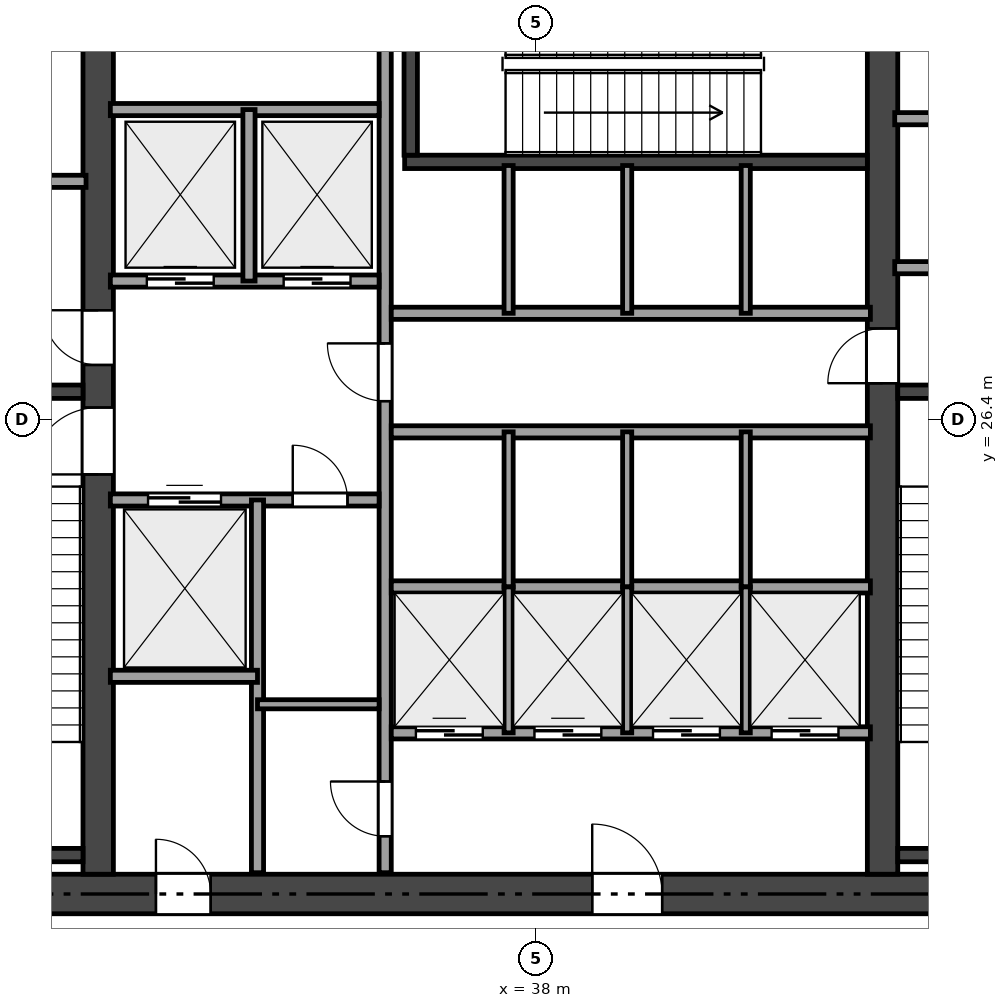
"""IFC4 building model, lengths in metres.
Left out: names, types, materials, properties, quantities, classifications, styles, units other than length and angle.
Written with IfcOpenShell. Run it as: python <this file> out.ifc"""

import sys

from ifc_helpers import new_model, si_unit, direction, frame, frame_2d, origin, place, context, subcontext, project, spatial, rectangle, extrude, element, fill, save


model = new_model("IFC4")
c1 = context("Model", 3, precision=1e-05, world=origin(), true_north=direction((0.0, 1.0)))
c2 = subcontext(c1, "Body", "Model", "MODEL_VIEW")
j1 = project(units=[si_unit("LENGTHUNIT", "METRE"), si_unit("PLANEANGLEUNIT", "RADIAN")], contexts=[c1])
p1 = place(None, origin())
s1 = spatial("IfcSite", under=j1, at=p1, CompositionType="ELEMENT")
p2 = place(p1, origin())
s2 = spatial("IfcBuilding", under=s1, at=p2, CompositionType="ELEMENT")
p3 = place(p2, frame((0.0, 0.0, -5.4)))
s3 = spatial("IfcBuildingStorey", under=s2, at=p3, CompositionType="ELEMENT", Elevation=-5.4)
p4 = place(p3, frame((26.475, 18.6, 0.0), z_axis=(0.0, 0.0, 1.0), x_axis=(1.0, 0.0, 0.0)))
e1 = element("IfcWall", 1, at=p4, inside=s3, PredefinedType="SHEAR", context=c2, shape_type="SweptSolid", body=[
    extrude(rectangle(XDim=21.45, YDim=0.65, at=frame_2d((10.725, 0.0))), origin(), (0.0, 0.0, 1.0), 5.05),
])
p5 = place(p4, frame((12.45, 0.0, 0.0)))
e2 = element("IfcOpeningElement", 2, at=p5, cuts=e1, PredefinedType="OPENING", context=c2, shape_type="SweptSolid", body=[
    extrude(rectangle(XDim=1.15, YDim=2.15, at=frame_2d((0.575, 1.075))), frame((0.0, 0.335, 0.0), z_axis=(0.0, -1.0, 0.0), x_axis=(1.0, 0.0, 0.0)), (0.0, 0.0, 1.0), 0.67),
])
p6 = place(p4, frame((5.275, 0.0, 0.0)))
e3 = element("IfcOpeningElement", 3, at=p6, cuts=e1, PredefinedType="OPENING", context=c2, shape_type="SweptSolid", body=[
    extrude(rectangle(XDim=0.9, YDim=2.1, at=frame_2d((0.45, 1.05))), frame((0.0, 0.335, 0.0), z_axis=(0.0, -1.0, 0.0), x_axis=(1.0, 0.0, 0.0)), (0.0, 0.0, 1.0), 0.67),
])
p7 = place(p3, frame((30.8, 18.925, 0.0), z_axis=(0.0, 0.0, 1.0), x_axis=(0.0, 1.0, 0.0)))
e4 = element("IfcWall", 4, at=p7, inside=s3, PredefinedType="SHEAR", context=c2, shape_type="SweptSolid", body=[
    extrude(rectangle(XDim=14.95, YDim=0.5, at=frame_2d((7.475, 0.0))), origin(), (0.0, 0.0, 1.0), 5.05),
])
p8 = place(p7, frame((6.575, 0.0, 0.0)))
e5 = element("IfcOpeningElement", 5, at=p8, cuts=e4, PredefinedType="OPENING", context=c2, shape_type="SweptSolid", body=[
    extrude(rectangle(XDim=1.1, YDim=2.15, at=frame_2d((0.55, 1.075))), frame((0.0, 0.26, 0.0), z_axis=(0.0, -1.0, 0.0), x_axis=(1.0, 0.0, 0.0)), (0.0, 0.0, 1.0), 0.52),
])
p9 = place(p7, frame((8.375, 0.0, 0.0)))
e6 = element("IfcOpeningElement", 6, at=p9, cuts=e4, PredefinedType="OPENING", context=c2, shape_type="SweptSolid", body=[
    extrude(rectangle(XDim=0.9, YDim=2.1, at=frame_2d((0.45, 1.05))), frame((0.0, 0.26, 0.0), z_axis=(0.0, -1.0, 0.0), x_axis=(1.0, 0.0, 0.0)), (0.0, 0.0, 1.0), 0.52),
])
p10 = place(p3, frame((43.7, 18.925, 0.0), z_axis=(0.0, 0.0, 1.0), x_axis=(0.0, 1.0, 0.0)))
e7 = element("IfcWall", 7, at=p10, inside=s3, PredefinedType="SHEAR", context=c2, shape_type="SweptSolid", body=[
    extrude(rectangle(XDim=14.95, YDim=0.5, at=frame_2d((7.475, 0.0))), origin(), (0.0, 0.0, 1.0), 5.05),
])
p11 = place(p10, frame((8.075, 0.0, 0.0)))
e8 = element("IfcOpeningElement", 8, at=p11, cuts=e7, PredefinedType="OPENING", context=c2, shape_type="SweptSolid", body=[
    extrude(rectangle(XDim=0.9, YDim=2.1, at=frame_2d((0.45, 1.05))), frame((0.0, 0.26, 0.0), z_axis=(0.0, -1.0, 0.0), x_axis=(1.0, 0.0, 0.0)), (0.0, 0.0, 1.0), 0.52),
])
for number, where, z_axis, x_axis in (
    (9, (27.125, 26.86, 0.0), (0.0, 0.0, 1.0), (1.0, 0.0, 0.0)),
    (10, (27.125, 19.24, 0.0), (0.0, 0.0, 1.0), (1.0, 0.0, 0.0)),
):
    element("IfcWall", number, at=place(p3, frame(where, z_axis=z_axis, x_axis=x_axis)), inside=s3, PredefinedType="SHEAR", context=c2, shape_type="SweptSolid", body=[
        extrude(rectangle(XDim=3.425, YDim=0.22, at=frame_2d((1.712, 0.0))), origin(), (0.0, 0.0, 1.0), 5.05),
    ])
for number, where, z_axis, x_axis in (
    (11, (43.95, 26.86, 0.0), (0.0, 0.0, 1.0), (1.0, 0.0, 0.0)),
    (12, (43.95, 19.24, 0.0), (0.0, 0.0, 1.0), (1.0, 0.0, 0.0)),
):
    element("IfcWall", number, at=place(p3, frame(where, z_axis=z_axis, x_axis=x_axis)), inside=s3, PredefinedType="SHEAR", context=c2, shape_type="SweptSolid", body=[
        extrude(rectangle(XDim=3.325, YDim=0.22, at=frame_2d((1.663, 0.0))), origin(), (0.0, 0.0, 1.0), 5.05),
    ])
p12 = place(p3, frame((35.84, 30.64, 0.0), z_axis=(0.0, 0.0, 1.0), x_axis=(1.0, 0.0, 0.0)))
e13 = element("IfcWall", 13, at=p12, inside=s3, PredefinedType="SHEAR", context=c2, shape_type="SweptSolid", body=[
    extrude(rectangle(XDim=7.61, YDim=0.22, at=frame_2d((3.805, 0.0))), origin(), (0.0, 0.0, 1.0), 5.05),
])
p13 = place(p3, frame((35.94, 30.75, 0.0), z_axis=(0.0, 0.0, 1.0), x_axis=(0.0, 1.0, 0.0)))
e14 = element("IfcWall", 14, at=p13, inside=s3, PredefinedType="SHEAR", context=c2, shape_type="SweptSolid", body=[
    extrude(rectangle(XDim=3.125, YDim=0.22, at=frame_2d((1.562, 0.0))), origin(), (0.0, 0.0, 1.0), 5.05),
])
p14 = place(p3, frame((27.15, 30.32, 0.0), z_axis=(0.0, 0.0, 1.0), x_axis=(1.0, 0.0, 0.0)))
e15 = element("IfcWall", 15, at=p14, inside=s3, PredefinedType="SOLIDWALL", context=c2, shape_type="SweptSolid", body=[
    extrude(rectangle(XDim=3.45, YDim=0.2, at=frame_2d((1.725, 0.0))), origin(), (0.0, 0.0, 1.0), 5.05),
])
p15 = place(p3, frame((43.9, 28.9, 0.0), z_axis=(0.0, 0.0, 1.0), x_axis=(1.0, 0.0, 0.0)))
e16 = element("IfcWall", 16, at=p15, inside=s3, PredefinedType="SOLIDWALL", context=c2, shape_type="SweptSolid", body=[
    extrude(rectangle(XDim=3.35, YDim=0.2, at=frame_2d((1.675, 0.0))), origin(), (0.0, 0.0, 1.0), 5.05),
])
p16 = place(p15, frame((1.15, 0.0, 0.0)))
e17 = element("IfcOpeningElement", 17, at=p16, cuts=e16, PredefinedType="OPENING", context=c2, shape_type="SweptSolid", body=[
    extrude(rectangle(XDim=0.9, YDim=2.1, at=frame_2d((0.45, 1.05))), frame((0.0, 0.11, 0.0), z_axis=(0.0, -1.0, 0.0), x_axis=(1.0, 0.0, 0.0)), (0.0, 0.0, 1.0), 0.22),
])
p17 = place(p3, frame((43.9, 31.35, 0.0), z_axis=(0.0, 0.0, 1.0), x_axis=(1.0, 0.0, 0.0)))
e18 = element("IfcWall", 18, at=p17, inside=s3, PredefinedType="SOLIDWALL", context=c2, shape_type="SweptSolid", body=[
    extrude(rectangle(XDim=3.35, YDim=0.2, at=frame_2d((1.675, 0.0))), origin(), (0.0, 0.0, 1.0), 5.05),
])
p18 = place(p3, frame((35.52, 18.95, 0.0), z_axis=(0.0, 0.0, 1.0), x_axis=(0.0, 1.0, 0.0)))
e19 = element("IfcWall", 19, at=p18, inside=s3, PredefinedType="SOLIDWALL", context=c2, shape_type="SweptSolid", body=[
    extrude(rectangle(XDim=14.9, YDim=0.2, at=frame_2d((7.45, 0.0))), origin(), (0.0, 0.0, 1.0), 4.571),
])
p19 = place(p18, frame((7.755, 0.0, 0.0)))
e20 = element("IfcOpeningElement", 20, at=p19, cuts=e19, PredefinedType="OPENING", context=c2, shape_type="SweptSolid", body=[
    extrude(rectangle(XDim=0.95, YDim=2.15, at=frame_2d((0.475, 1.075))), frame((0.0, 0.11, 0.0), z_axis=(0.0, -1.0, 0.0), x_axis=(1.0, 0.0, 0.0)), (0.0, 0.0, 1.0), 0.22),
])
p20 = place(p18, frame((0.6, 0.0, 0.0)))
e21 = element("IfcOpeningElement", 21, at=p20, cuts=e19, PredefinedType="OPENING", context=c2, shape_type="SweptSolid", body=[
    extrude(rectangle(XDim=0.9, YDim=2.1, at=frame_2d((0.45, 1.05))), frame((0.0, 0.11, 0.0), z_axis=(0.0, -1.0, 0.0), x_axis=(1.0, 0.0, 0.0)), (0.0, 0.0, 1.0), 0.22),
])
p21 = place(p3, frame((31.0, 28.68, 0.0), z_axis=(0.0, 0.0, 1.0), x_axis=(1.0, 0.0, 0.0)))
e22 = element("IfcWall", 22, at=p21, inside=s3, PredefinedType="SOLIDWALL", context=c2, shape_type="SweptSolid", body=[
    extrude(rectangle(XDim=4.42, YDim=0.2, at=frame_2d((2.21, 0.0))), origin(), (0.0, 0.0, 1.0), 5.05),
])
p22 = place(p21, frame((0.6, 0.0, 0.0)))
e23 = element("IfcOpeningElement", 23, at=p22, cuts=e22, PredefinedType="OPENING", context=c2, shape_type="SweptSolid", body=[
    extrude(rectangle(XDim=1.1, YDim=2.15, at=frame_2d((0.55, 1.075))), frame((0.0, 0.11, 0.0), z_axis=(0.0, -1.0, 0.0), x_axis=(1.0, 0.0, 0.0)), (0.0, 0.0, 1.0), 0.22),
])
p23 = place(p21, frame((2.85, 0.0, 0.0)))
e24 = element("IfcOpeningElement", 24, at=p23, cuts=e22, PredefinedType="OPENING", context=c2, shape_type="SweptSolid", body=[
    extrude(rectangle(XDim=1.1, YDim=2.15, at=frame_2d((0.55, 1.075))), frame((0.0, 0.11, 0.0), z_axis=(0.0, -1.0, 0.0), x_axis=(1.0, 0.0, 0.0)), (0.0, 0.0, 1.0), 0.22),
])
p24 = place(p3, frame((31.0, 31.5, 0.0), z_axis=(0.0, 0.0, 1.0), x_axis=(1.0, 0.0, 0.0)))
e25 = element("IfcWall", 25, at=p24, inside=s3, PredefinedType="SOLIDWALL", context=c2, shape_type="SweptSolid", body=[
    extrude(rectangle(XDim=4.42, YDim=0.2, at=frame_2d((2.21, 0.0))), origin(), (0.0, 0.0, 1.0), 5.05),
])
p25 = place(p3, frame((33.28, 28.68, 0.0), z_axis=(0.0, 0.0, 1.0), x_axis=(0.0, 1.0, 0.0)))
e26 = element("IfcWall", 26, at=p25, inside=s3, PredefinedType="SOLIDWALL", context=c2, shape_type="SweptSolid", body=[
    extrude(rectangle(XDim=2.82, YDim=0.2, at=frame_2d((1.41, 0.0))), origin(), (0.0, 0.0, 1.0), 5.05),
])
p26 = place(p3, frame((31.0, 25.08, 0.0), z_axis=(0.0, 0.0, 1.0), x_axis=(1.0, 0.0, 0.0)))
e27 = element("IfcWall", 27, at=p26, inside=s3, PredefinedType="SOLIDWALL", context=c2, shape_type="SweptSolid", body=[
    extrude(rectangle(XDim=4.42, YDim=0.2, at=frame_2d((2.21, 0.0))), origin(), (0.0, 0.0, 1.0), 5.05),
])
p27 = place(p26, frame((3.0, 0.0, 0.0)))
e28 = element("IfcOpeningElement", 28, at=p27, cuts=e27, PredefinedType="OPENING", context=c2, shape_type="SweptSolid", body=[
    extrude(rectangle(XDim=0.9, YDim=2.1, at=frame_2d((0.45, 1.05))), frame((0.0, 0.11, 0.0), z_axis=(0.0, -1.0, 0.0), x_axis=(1.0, 0.0, 0.0)), (0.0, 0.0, 1.0), 0.22),
])
p28 = place(p26, frame((0.62, 0.0, 0.0)))
e29 = element("IfcOpeningElement", 29, at=p28, cuts=e27, PredefinedType="OPENING", context=c2, shape_type="SweptSolid", body=[
    extrude(rectangle(XDim=1.2, YDim=2.15, at=frame_2d((0.6, 1.075))), frame((0.0, 0.11, 0.0), z_axis=(0.0, -1.0, 0.0), x_axis=(1.0, 0.0, 0.0)), (0.0, 0.0, 1.0), 0.22),
])
p29 = place(p3, frame((33.42, 18.95, 0.0), z_axis=(0.0, 0.0, 1.0), x_axis=(0.0, 1.0, 0.0)))
e30 = element("IfcWall", 30, at=p29, inside=s3, PredefinedType="SOLIDWALL", context=c2, shape_type="SweptSolid", body=[
    extrude(rectangle(XDim=6.13, YDim=0.2, at=frame_2d((3.065, 0.0))), origin(), (0.0, 0.0, 1.0), 4.571),
])
p30 = place(p3, frame((31.0, 22.18, 0.0), z_axis=(0.0, 0.0, 1.0), x_axis=(1.0, 0.0, 0.0)))
e31 = element("IfcWall", 31, at=p30, inside=s3, PredefinedType="SOLIDWALL", context=c2, shape_type="SweptSolid", body=[
    extrude(rectangle(XDim=2.42, YDim=0.2, at=frame_2d((1.21, 0.0))), origin(), (0.0, 0.0, 1.0), 5.05),
])
p31 = place(p3, frame((33.42, 21.72, 0.0), z_axis=(0.0, 0.0, 1.0), x_axis=(1.0, 0.0, 0.0)))
e32 = element("IfcWall", 32, at=p31, inside=s3, PredefinedType="PARTITIONING", context=c2, shape_type="SweptSolid", body=[
    extrude(rectangle(XDim=2.0, YDim=0.15, at=frame_2d((1.0, 0.0))), origin(), (0.0, 0.0, 1.0), 5.05),
])
for number, where, z_axis, x_axis in (
    (33, (35.62, 28.15, 0.0), (0.0, 0.0, 1.0), (1.0, 0.0, 0.0)),
    (34, (35.62, 26.2, 0.0), (0.0, 0.0, 1.0), (1.0, 0.0, 0.0)),
):
    element("IfcWall", number, at=place(p3, frame(where, z_axis=z_axis, x_axis=x_axis)), inside=s3, PredefinedType="SOLIDWALL", context=c2, shape_type="SweptSolid", body=[
        extrude(rectangle(XDim=7.88, YDim=0.2, at=frame_2d((3.94, 0.0))), origin(), (0.0, 0.0, 1.0), 5.05),
    ])
p32 = place(p3, frame((35.62, 23.65, 0.0), z_axis=(0.0, 0.0, 1.0), x_axis=(1.0, 0.0, 0.0)))
e35 = element("IfcWall", 35, at=p32, inside=s3, PredefinedType="SOLIDWALL", context=c2, shape_type="SweptSolid", body=[
    extrude(rectangle(XDim=7.88, YDim=0.2, at=frame_2d((3.94, 0.0))), origin(), (0.0, 0.0, 1.0), 4.571),
])
p33 = place(p3, frame((35.62, 21.25, 0.0), z_axis=(0.0, 0.0, 1.0), x_axis=(1.0, 0.0, 0.0)))
e36 = element("IfcWall", 36, at=p33, inside=s3, PredefinedType="SOLIDWALL", context=c2, shape_type="SweptSolid", body=[
    extrude(rectangle(XDim=7.88, YDim=0.2, at=frame_2d((3.94, 0.0))), origin(), (0.0, 0.0, 1.0), 5.05),
])
p34 = place(p33, frame((0.405, 0.0, 0.0)))
e37 = element("IfcOpeningElement", 37, at=p34, cuts=e36, PredefinedType="OPENING", context=c2, shape_type="SweptSolid", body=[
    extrude(rectangle(XDim=1.1, YDim=2.15, at=frame_2d((0.55, 1.075))), frame((0.0, 0.11, 0.0), z_axis=(0.0, -1.0, 0.0), x_axis=(1.0, 0.0, 0.0)), (0.0, 0.0, 1.0), 0.22),
])
p35 = place(p33, frame((2.355, 0.0, 0.0)))
e38 = element("IfcOpeningElement", 38, at=p35, cuts=e36, PredefinedType="OPENING", context=c2, shape_type="SweptSolid", body=[
    extrude(rectangle(XDim=1.1, YDim=2.15, at=frame_2d((0.55, 1.075))), frame((0.0, 0.11, 0.0), z_axis=(0.0, -1.0, 0.0), x_axis=(1.0, 0.0, 0.0)), (0.0, 0.0, 1.0), 0.22),
])
p36 = place(p33, frame((4.305, 0.0, 0.0)))
e39 = element("IfcOpeningElement", 39, at=p36, cuts=e36, PredefinedType="OPENING", context=c2, shape_type="SweptSolid", body=[
    extrude(rectangle(XDim=1.1, YDim=2.15, at=frame_2d((0.55, 1.075))), frame((0.0, 0.11, 0.0), z_axis=(0.0, -1.0, 0.0), x_axis=(1.0, 0.0, 0.0)), (0.0, 0.0, 1.0), 0.22),
])
p37 = place(p33, frame((6.255, 0.0, 0.0)))
e40 = element("IfcOpeningElement", 40, at=p37, cuts=e36, PredefinedType="OPENING", context=c2, shape_type="SweptSolid", body=[
    extrude(rectangle(XDim=1.1, YDim=2.15, at=frame_2d((0.55, 1.075))), frame((0.0, 0.11, 0.0), z_axis=(0.0, -1.0, 0.0), x_axis=(1.0, 0.0, 0.0)), (0.0, 0.0, 1.0), 0.22),
])
for number, where, z_axis, x_axis in (
    (41, (37.55, 28.15, 0.0), (0.0, 0.0, 1.0), (0.0, 1.0, 0.0)),
    (42, (39.5, 28.15, 0.0), (0.0, 0.0, 1.0), (0.0, 1.0, 0.0)),
    (43, (41.45, 28.15, 0.0), (0.0, 0.0, 1.0), (0.0, 1.0, 0.0)),
):
    element("IfcWall", number, at=place(p3, frame(where, z_axis=z_axis, x_axis=x_axis)), inside=s3, PredefinedType="PARTITIONING", context=c2, shape_type="SweptSolid", body=[
        extrude(rectangle(XDim=2.43, YDim=0.15, at=frame_2d((1.215, 0.0))), origin(), (0.0, 0.0, 1.0), 5.05),
    ])
for number, where, z_axis, x_axis in (
    (44, (37.55, 23.65, 0.0), (0.0, 0.0, 1.0), (0.0, 1.0, 0.0)),
    (45, (39.5, 23.65, 0.0), (0.0, 0.0, 1.0), (0.0, 1.0, 0.0)),
    (46, (41.45, 23.65, 0.0), (0.0, 0.0, 1.0), (0.0, 1.0, 0.0)),
):
    element("IfcWall", number, at=place(p3, frame(where, z_axis=z_axis, x_axis=x_axis)), inside=s3, PredefinedType="PARTITIONING", context=c2, shape_type="SweptSolid", body=[
        extrude(rectangle(XDim=2.55, YDim=0.15, at=frame_2d((1.275, 0.0))), origin(), (0.0, 0.0, 1.0), 4.571),
    ])
for number, where, z_axis, x_axis in (
    (47, (37.55, 21.25, 0.0), (0.0, 0.0, 1.0), (0.0, 1.0, 0.0)),
    (48, (39.5, 21.25, 0.0), (0.0, 0.0, 1.0), (0.0, 1.0, 0.0)),
    (49, (41.45, 21.25, 0.0), (0.0, 0.0, 1.0), (0.0, 1.0, 0.0)),
):
    element("IfcWall", number, at=place(p3, frame(where, z_axis=z_axis, x_axis=x_axis)), inside=s3, PredefinedType="PARTITIONING", context=c2, shape_type="SweptSolid", body=[
        extrude(rectangle(XDim=2.4, YDim=0.15, at=frame_2d((1.2, 0.0))), origin(), (0.0, 0.0, 1.0), 4.571),
    ])
p38 = place(p8, origin())
e50 = element("IfcDoor", 50, at=p38, inside=s3, OperationType="SINGLE_SWING_LEFT", PredefinedType="DOOR", context=c2, shape_type="SweptSolid", body=[
    extrude(rectangle(XDim=1.1, YDim=2.15, at=frame_2d((0.55, 1.075))), frame((0.0, 0.025, 0.0), z_axis=(0.0, -1.0, 0.0), x_axis=(1.0, 0.0, 0.0)), (0.0, 0.0, 1.0), 0.05),
])
fill(e5, e50)
p39 = place(p19, origin())
e51 = element("IfcDoor", 51, at=p39, inside=s3, OperationType="SINGLE_SWING_RIGHT", PredefinedType="DOOR", context=c2, shape_type="SweptSolid", body=[
    extrude(rectangle(XDim=0.95, YDim=2.15, at=frame_2d((0.475, 1.075))), frame((0.0, 0.025, 0.0), z_axis=(0.0, -1.0, 0.0), x_axis=(1.0, 0.0, 0.0)), (0.0, 0.0, 1.0), 0.05),
])
fill(e20, e51)
p40 = place(p11, origin())
e52 = element("IfcDoor", 52, at=p40, inside=s3, OperationType="SINGLE_SWING_LEFT", PredefinedType="DOOR", context=c2, shape_type="SweptSolid", body=[
    extrude(rectangle(XDim=0.9, YDim=2.1, at=frame_2d((0.45, 1.05))), frame((0.0, 0.025, 0.0), z_axis=(0.0, -1.0, 0.0), x_axis=(1.0, 0.0, 0.0)), (0.0, 0.0, 1.0), 0.05),
])
fill(e8, e52)
p41 = place(p5, origin())
e53 = element("IfcDoor", 53, at=p41, inside=s3, OperationType="SINGLE_SWING_LEFT", PredefinedType="DOOR", context=c2, shape_type="SweptSolid", body=[
    extrude(rectangle(XDim=1.15, YDim=2.15, at=frame_2d((0.575, 1.075))), frame((0.0, 0.025, 0.0), z_axis=(0.0, -1.0, 0.0), x_axis=(1.0, 0.0, 0.0)), (0.0, 0.0, 1.0), 0.05),
])
fill(e2, e53)
p42 = place(p9, origin())
e54 = element("IfcDoor", 54, at=p42, inside=s3, OperationType="SINGLE_SWING_RIGHT", PredefinedType="DOOR", context=c2, shape_type="SweptSolid", body=[
    extrude(rectangle(XDim=0.9, YDim=2.1, at=frame_2d((0.45, 1.05))), frame((0.0, 0.025, 0.0), z_axis=(0.0, -1.0, 0.0), x_axis=(1.0, 0.0, 0.0)), (0.0, 0.0, 1.0), 0.05),
])
fill(e6, e54)
p43 = place(p6, origin())
e55 = element("IfcDoor", 55, at=p43, inside=s3, OperationType="SINGLE_SWING_LEFT", PredefinedType="DOOR", context=c2, shape_type="SweptSolid", body=[
    extrude(rectangle(XDim=0.9, YDim=2.1, at=frame_2d((0.45, 1.05))), frame((0.0, 0.025, 0.0), z_axis=(0.0, -1.0, 0.0), x_axis=(1.0, 0.0, 0.0)), (0.0, 0.0, 1.0), 0.05),
])
fill(e3, e55)
p44 = place(p20, origin())
e56 = element("IfcDoor", 56, at=p44, inside=s3, OperationType="SINGLE_SWING_RIGHT", PredefinedType="DOOR", context=c2, shape_type="SweptSolid", body=[
    extrude(rectangle(XDim=0.9, YDim=2.1, at=frame_2d((0.45, 1.05))), frame((0.0, 0.025, 0.0), z_axis=(0.0, -1.0, 0.0), x_axis=(1.0, 0.0, 0.0)), (0.0, 0.0, 1.0), 0.05),
])
fill(e21, e56)
p45 = place(p27, origin())
e57 = element("IfcDoor", 57, at=p45, inside=s3, OperationType="SINGLE_SWING_LEFT", PredefinedType="DOOR", context=c2, shape_type="SweptSolid", body=[
    extrude(rectangle(XDim=0.9, YDim=2.1, at=frame_2d((0.45, 1.05))), frame((0.0, 0.025, 0.0), z_axis=(0.0, -1.0, 0.0), x_axis=(1.0, 0.0, 0.0)), (0.0, 0.0, 1.0), 0.05),
])
fill(e28, e57)
p46 = place(p22, origin())
e58 = element("IfcDoor", 58, at=p46, inside=s3, OperationType="SLIDING_TO_LEFT", PredefinedType="DOOR", context=c2, shape_type="SweptSolid", body=[
    extrude(rectangle(XDim=1.1, YDim=2.15, at=frame_2d((0.55, 1.075))), frame((0.0, 0.025, 0.0), z_axis=(0.0, -1.0, 0.0), x_axis=(1.0, 0.0, 0.0)), (0.0, 0.0, 1.0), 0.05),
])
fill(e23, e58)
p47 = place(p23, origin())
e59 = element("IfcDoor", 59, at=p47, inside=s3, OperationType="SLIDING_TO_LEFT", PredefinedType="DOOR", context=c2, shape_type="SweptSolid", body=[
    extrude(rectangle(XDim=1.1, YDim=2.15, at=frame_2d((0.55, 1.075))), frame((0.0, 0.025, 0.0), z_axis=(0.0, -1.0, 0.0), x_axis=(1.0, 0.0, 0.0)), (0.0, 0.0, 1.0), 0.05),
])
fill(e24, e59)
p48 = place(p28, origin())
e60 = element("IfcDoor", 60, at=p48, inside=s3, OperationType="SLIDING_TO_LEFT", PredefinedType="DOOR", context=c2, shape_type="SweptSolid", body=[
    extrude(rectangle(XDim=1.2, YDim=2.15, at=frame_2d((0.6, 1.075))), frame((0.0, 0.025, 0.0), z_axis=(0.0, -1.0, 0.0), x_axis=(1.0, 0.0, 0.0)), (0.0, 0.0, 1.0), 0.05),
])
fill(e29, e60)
p49 = place(p34, origin())
e61 = element("IfcDoor", 61, at=p49, inside=s3, OperationType="SLIDING_TO_LEFT", PredefinedType="DOOR", context=c2, shape_type="SweptSolid", body=[
    extrude(rectangle(XDim=1.1, YDim=2.15, at=frame_2d((0.55, 1.075))), frame((0.0, 0.025, 0.0), z_axis=(0.0, -1.0, 0.0), x_axis=(1.0, 0.0, 0.0)), (0.0, 0.0, 1.0), 0.05),
])
fill(e37, e61)
p50 = place(p35, origin())
e62 = element("IfcDoor", 62, at=p50, inside=s3, OperationType="SLIDING_TO_LEFT", PredefinedType="DOOR", context=c2, shape_type="SweptSolid", body=[
    extrude(rectangle(XDim=1.1, YDim=2.15, at=frame_2d((0.55, 1.075))), frame((0.0, 0.025, 0.0), z_axis=(0.0, -1.0, 0.0), x_axis=(1.0, 0.0, 0.0)), (0.0, 0.0, 1.0), 0.05),
])
fill(e38, e62)
p51 = place(p36, origin())
e63 = element("IfcDoor", 63, at=p51, inside=s3, OperationType="SLIDING_TO_LEFT", PredefinedType="DOOR", context=c2, shape_type="SweptSolid", body=[
    extrude(rectangle(XDim=1.1, YDim=2.15, at=frame_2d((0.55, 1.075))), frame((0.0, 0.025, 0.0), z_axis=(0.0, -1.0, 0.0), x_axis=(1.0, 0.0, 0.0)), (0.0, 0.0, 1.0), 0.05),
])
fill(e39, e63)
p52 = place(p37, origin())
e64 = element("IfcDoor", 64, at=p52, inside=s3, OperationType="SLIDING_TO_LEFT", PredefinedType="DOOR", context=c2, shape_type="SweptSolid", body=[
    extrude(rectangle(XDim=1.1, YDim=2.15, at=frame_2d((0.55, 1.075))), frame((0.0, 0.025, 0.0), z_axis=(0.0, -1.0, 0.0), x_axis=(1.0, 0.0, 0.0)), (0.0, 0.0, 1.0), 0.05),
])
fill(e40, e64)
save(model, sys.argv[1])
